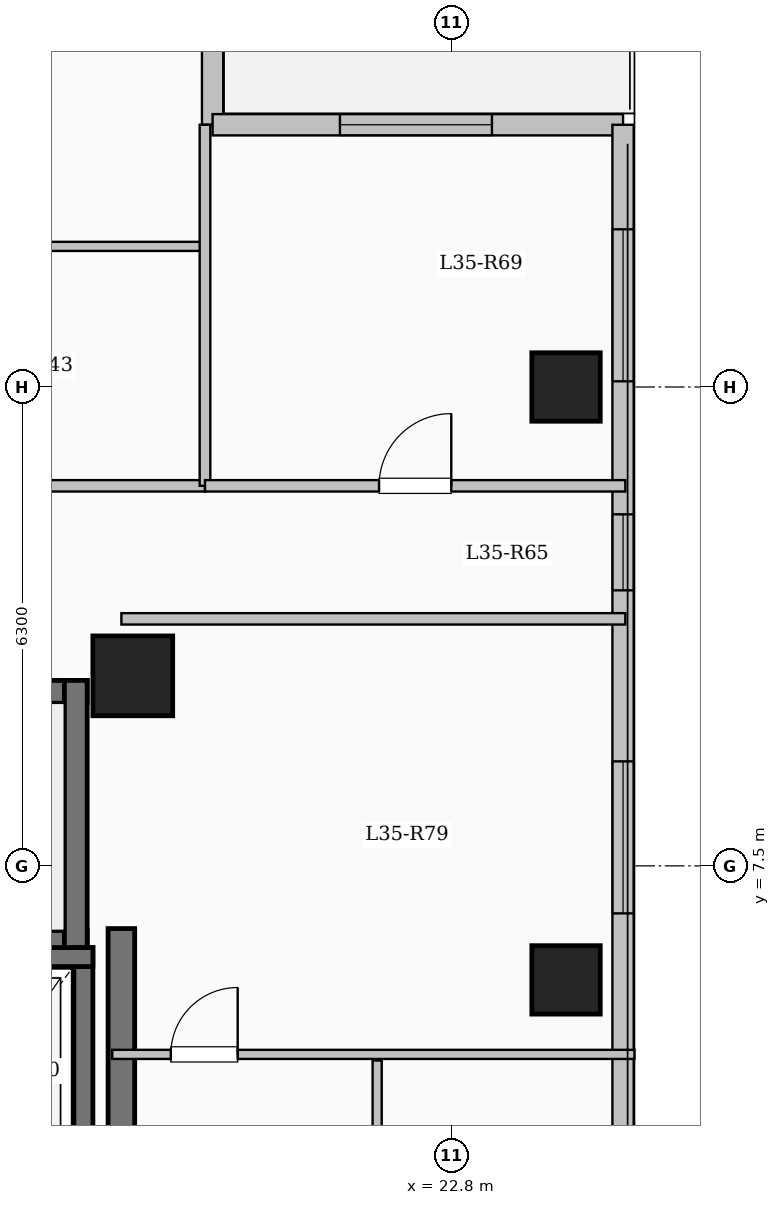
"""IFC4 building model, lengths in metres.
Left out: names, types, materials, properties, quantities, classifications, styles, units other than length and angle.
Written with IfcOpenShell. Run it as: python <this file> out.ifc"""

import sys

from ifc_helpers import new_model, si_unit, direction, frame, frame_2d, origin, origin_2d, place, context, subcontext, project, spatial, rectangle, extrude, element, fill, save


model = new_model("IFC4")
c1 = context("Model", 3, precision=1e-05, world=origin(), true_north=direction((0.0, 1.0)))
c2 = subcontext(c1, "Body", "Model", "MODEL_VIEW")
j1 = project(units=[si_unit("LENGTHUNIT", "METRE"), si_unit("PLANEANGLEUNIT", "RADIAN")], contexts=[c1])
p1 = place(None, origin())
s1 = spatial("IfcSite", under=j1, at=p1, CompositionType="ELEMENT")
p2 = place(p1, origin())
s2 = spatial("IfcBuilding", under=s1, at=p2, CompositionType="ELEMENT")
p3 = place(p2, frame((0.0, 0.0, 132.6)))
s3 = spatial("IfcBuildingStorey", under=s2, at=p3, CompositionType="ELEMENT", Elevation=132.6)
p4 = place(p3, frame((18.6, 10.0, 0.0), z_axis=(0.0, 0.0, 1.0), x_axis=(1.0, 0.0, 0.0)))
e1 = element("IfcColumn", 1, at=p4, inside=s3, PredefinedType="COLUMN", context=c2, shape_type="SweptSolid", body=[
    extrude(rectangle(XDim=1.05, YDim=1.05, at=origin_2d()), origin(), (0.0, 0.0, 1.0), 3.35),
])
for number, where, z_axis, x_axis in (
    (2, (24.3, 6.0, 0.0), (0.0, 0.0, 1.0), (1.0, 0.0, 0.0)),
    (3, (24.3, 13.8, 0.0), (0.0, 0.0, 1.0), (1.0, 0.0, 0.0)),
):
    element("IfcColumn", number, at=place(p3, frame(where, z_axis=z_axis, x_axis=x_axis)), inside=s3, PredefinedType="COLUMN", context=c2, shape_type="SweptSolid", body=[
        extrude(rectangle(XDim=0.9, YDim=0.9, at=origin_2d()), origin(), (0.0, 0.0, 1.0), 3.35),
    ])
p5 = place(p3, frame((19.65, 21.15, 0.0), z_axis=(0.0, 0.0, 1.0), x_axis=(0.0, -1.0, 0.0)))
e4 = element("IfcWall", 4, at=p5, inside=s3, PredefinedType="SOLIDWALL", context=c2, shape_type="SweptSolid", body=[
    extrude(rectangle(XDim=3.9, YDim=0.28, at=frame_2d((1.95, 0.0))), origin(), (0.0, 0.0, 1.0), 3.1),
])
p6 = place(p5, frame((1.5, 0.0, 0.0)))
e5 = element("IfcOpeningElement", 5, at=p6, cuts=e4, PredefinedType="OPENING", context=c2, shape_type="SweptSolid", body=[
    extrude(rectangle(XDim=1.1, YDim=2.2, at=frame_2d((0.55, 1.1))), frame((0.0, 0.15, 0.0), z_axis=(0.0, -1.0, 0.0), x_axis=(1.0, 0.0, 0.0)), (0.0, 0.0, 1.0), 0.3),
])
p7 = place(p5, frame((0.355, 0.0, 0.95)))
e6 = element("IfcOpeningElement", 6, at=p7, cuts=e4, PredefinedType="OPENING", context=c2, shape_type="SweptSolid", body=[
    extrude(rectangle(XDim=1.0, YDim=1.5, at=frame_2d((0.5, 0.75))), frame((0.0, 0.15, 0.0), z_axis=(0.0, -1.0, 0.0), x_axis=(1.0, 0.0, 0.0)), (0.0, 0.0, 1.0), 0.3),
])
p8 = place(p3, frame((19.65, 17.25, 0.0), z_axis=(0.0, 0.0, 1.0), x_axis=(1.0, 0.0, 0.0)))
e7 = element("IfcWall", 7, at=p8, inside=s3, PredefinedType="SOLIDWALL", context=c2, shape_type="SweptSolid", body=[
    extrude(rectangle(XDim=5.4, YDim=0.28, at=frame_2d((2.7, 0.0))), origin(), (0.0, 0.0, 1.0), 3.1),
])
p9 = place(p8, frame((1.675, 0.0, 0.9)))
e8 = element("IfcOpeningElement", 8, at=p9, cuts=e7, PredefinedType="OPENING", context=c2, shape_type="SweptSolid", body=[
    extrude(rectangle(XDim=2.0, YDim=1.7, at=frame_2d((1.0, 0.85))), frame((0.0, 0.15, 0.0), z_axis=(0.0, -1.0, 0.0), x_axis=(1.0, 0.0, 0.0)), (0.0, 0.0, 1.0), 0.3),
])
p10 = place(p3, frame((25.05, 17.25, 0.0), z_axis=(0.0, 0.0, 1.0), x_axis=(0.0, -1.0, 0.0)))
e9 = element("IfcWall", 9, at=p10, inside=s3, PredefinedType="SOLIDWALL", context=c2, shape_type="SweptSolid", body=[
    extrude(rectangle(XDim=34.5, YDim=0.28, at=frame_2d((17.25, 0.0))), origin(), (0.0, 0.0, 1.0), 3.1),
])
p11 = place(p10, frame((1.375, 0.0, 0.9)))
e10 = element("IfcOpeningElement", 10, at=p11, cuts=e9, PredefinedType="OPENING", context=c2, shape_type="SweptSolid", body=[
    extrude(rectangle(XDim=2.0, YDim=1.7, at=frame_2d((1.0, 0.85))), frame((0.0, 0.15, 0.0), z_axis=(0.0, -1.0, 0.0), x_axis=(1.0, 0.0, 0.0)), (0.0, 0.0, 1.0), 0.3),
])
p12 = place(p10, frame((5.125, 0.0, 0.95)))
e11 = element("IfcOpeningElement", 11, at=p12, cuts=e9, PredefinedType="OPENING", context=c2, shape_type="SweptSolid", body=[
    extrude(rectangle(XDim=1.0, YDim=1.5, at=frame_2d((0.5, 0.75))), frame((0.0, 0.15, 0.0), z_axis=(0.0, -1.0, 0.0), x_axis=(1.0, 0.0, 0.0)), (0.0, 0.0, 1.0), 0.3),
])
p13 = place(p10, frame((8.375, 0.0, 0.9)))
e12 = element("IfcOpeningElement", 12, at=p13, cuts=e9, PredefinedType="OPENING", context=c2, shape_type="SweptSolid", body=[
    extrude(rectangle(XDim=2.0, YDim=1.7, at=frame_2d((1.0, 0.85))), frame((0.0, 0.15, 0.0), z_axis=(0.0, -1.0, 0.0), x_axis=(1.0, 0.0, 0.0)), (0.0, 0.0, 1.0), 0.3),
])
p14 = place(p10, frame((13.2, 0.0, 0.9)))
e13 = element("IfcOpeningElement", 13, at=p14, cuts=e9, PredefinedType="OPENING", context=c2, shape_type="SweptSolid", body=[
    extrude(rectangle(XDim=1.65, YDim=1.6, at=frame_2d((0.825, 0.8))), frame((0.0, 0.15, 0.0), z_axis=(0.0, -1.0, 0.0), x_axis=(1.0, 0.0, 0.0)), (0.0, 0.0, 1.0), 0.3),
])
p15 = place(p10, frame((19.05, 0.0, 0.9)))
e14 = element("IfcOpeningElement", 14, at=p15, cuts=e9, PredefinedType="OPENING", context=c2, shape_type="SweptSolid", body=[
    extrude(rectangle(XDim=2.2, YDim=1.75, at=frame_2d((1.1, 0.875))), frame((0.0, 0.15, 0.0), z_axis=(0.0, -1.0, 0.0), x_axis=(1.0, 0.0, 0.0)), (0.0, 0.0, 1.0), 0.3),
])
p16 = place(p10, frame((25.258, 0.0, 0.9)))
e15 = element("IfcOpeningElement", 15, at=p16, cuts=e9, PredefinedType="OPENING", context=c2, shape_type="SweptSolid", body=[
    extrude(rectangle(XDim=1.5, YDim=1.65, at=frame_2d((0.75, 0.825))), frame((0.0, 0.15, 0.0), z_axis=(0.0, -1.0, 0.0), x_axis=(1.0, 0.0, 0.0)), (0.0, 0.0, 1.0), 0.3),
])
p17 = place(p10, frame((29.95, 0.0, 0.9)))
e16 = element("IfcOpeningElement", 16, at=p17, cuts=e9, PredefinedType="OPENING", context=c2, shape_type="SweptSolid", body=[
    extrude(rectangle(XDim=2.2, YDim=1.75, at=frame_2d((1.1, 0.875))), frame((0.0, 0.15, 0.0), z_axis=(0.0, -1.0, 0.0), x_axis=(1.0, 0.0, 0.0)), (0.0, 0.0, 1.0), 0.3),
])
p18 = place(p3, frame((10.0, 9.79, 0.0), z_axis=(0.0, 0.0, 1.0), x_axis=(1.0, 0.0, 0.0)))
e17 = element("IfcWall", 17, at=p18, inside=s3, PredefinedType="SHEAR", context=c2, shape_type="SweptSolid", body=[
    extrude(rectangle(XDim=8.0, YDim=0.3, at=frame_2d((4.0, 0.0))), origin(), (0.0, 0.0, 1.0), 3.35),
])
p19 = place(p3, frame((10.0, 6.5, 0.0), z_axis=(0.0, 0.0, 1.0), x_axis=(1.0, 0.0, 0.0)))
e18 = element("IfcWall", 18, at=p19, inside=s3, PredefinedType="SHEAR", context=c2, shape_type="SweptSolid", body=[
    extrude(rectangle(XDim=8.0, YDim=0.3, at=frame_2d((4.0, 0.0))), origin(), (0.0, 0.0, 1.0), 3.35),
])
p20 = place(p19, frame((0.55, 0.0, 0.0)))
e19 = element("IfcOpeningElement", 19, at=p20, cuts=e18, PredefinedType="OPENING", context=c2, shape_type="SweptSolid", body=[
    extrude(rectangle(XDim=1.0, YDim=2.15, at=frame_2d((0.5, 1.075))), frame((0.0, 0.16, 0.0), z_axis=(0.0, -1.0, 0.0), x_axis=(1.0, 0.0, 0.0)), (0.0, 0.0, 1.0), 0.32),
])
p21 = place(p3, frame((17.85, 6.35, 0.0), z_axis=(0.0, 0.0, 1.0), x_axis=(0.0, 1.0, 0.0)))
e20 = element("IfcWall", 20, at=p21, inside=s3, PredefinedType="SHEAR", context=c2, shape_type="SweptSolid", body=[
    extrude(rectangle(XDim=3.59, YDim=0.3, at=frame_2d((1.795, 0.0))), origin(), (0.0, 0.0, 1.0), 3.35),
])
p22 = place(p3, frame((17.95, 3.175, 0.0), z_axis=(0.0, 0.0, 1.0), x_axis=(0.0, 1.0, 0.0)))
e21 = element("IfcWall", 21, at=p22, inside=s3, PredefinedType="SHEAR", context=c2, shape_type="SweptSolid", body=[
    extrude(rectangle(XDim=3.25, YDim=0.25, at=frame_2d((1.625, 0.0))), origin(), (0.0, 0.0, 1.0), 3.35),
])
p23 = place(p3, frame((15.525, 6.3, 0.0), z_axis=(0.0, 0.0, 1.0), x_axis=(1.0, 0.0, 0.0)))
e22 = element("IfcWall", 22, at=p23, inside=s3, PredefinedType="SHEAR", context=c2, shape_type="SweptSolid", body=[
    extrude(rectangle(XDim=2.55, YDim=0.25, at=frame_2d((1.275, 0.0))), origin(), (0.0, 0.0, 1.0), 3.35),
])
p24 = place(p3, frame((18.45, -7.375, 0.0), z_axis=(0.0, 0.0, 1.0), x_axis=(0.0, 1.0, 0.0)))
e23 = element("IfcWall", 23, at=p24, inside=s3, PredefinedType="SHEAR", context=c2, shape_type="SweptSolid", body=[
    extrude(rectangle(XDim=14.05, YDim=0.35, at=frame_2d((7.025, 0.0))), origin(), (0.0, 0.0, 1.0), 3.35),
])
p25 = place(p3, frame((3.85, 12.5, 0.0), z_axis=(0.0, 0.0, 1.0), x_axis=(1.0, 0.0, 0.0)))
e24 = element("IfcWall", 24, at=p25, inside=s3, PredefinedType="PARTITIONING", context=c2, shape_type="SweptSolid", body=[
    extrude(rectangle(XDim=15.7, YDim=0.15, at=frame_2d((7.85, 0.0))), origin(), (0.0, 0.0, 1.0), 3.1),
])
p26 = place(p25, frame((0.55, 0.0, 0.0)))
e25 = element("IfcOpeningElement", 25, at=p26, cuts=e24, PredefinedType="OPENING", context=c2, shape_type="SweptSolid", body=[
    extrude(rectangle(XDim=0.96, YDim=2.15, at=frame_2d((0.48, 1.075))), frame((0.0, 0.085, 0.0), z_axis=(0.0, -1.0, 0.0), x_axis=(1.0, 0.0, 0.0)), (0.0, 0.0, 1.0), 0.17),
])
p27 = place(p25, frame((7.28, 0.0, 0.0)))
e26 = element("IfcOpeningElement", 26, at=p27, cuts=e24, PredefinedType="OPENING", context=c2, shape_type="SweptSolid", body=[
    extrude(rectangle(XDim=0.96, YDim=2.15, at=frame_2d((0.48, 1.075))), frame((0.0, 0.085, 0.0), z_axis=(0.0, -1.0, 0.0), x_axis=(1.0, 0.0, 0.0)), (0.0, 0.0, 1.0), 0.17),
])
p28 = place(p3, frame((14.93, 15.65, 0.0), z_axis=(0.0, 0.0, 1.0), x_axis=(1.0, 0.0, 0.0)))
e27 = element("IfcWall", 27, at=p28, inside=s3, PredefinedType="PARTITIONING", context=c2, shape_type="SweptSolid", body=[
    extrude(rectangle(XDim=4.68, YDim=0.12, at=frame_2d((2.34, 0.0))), origin(), (0.0, 0.0, 1.0), 3.1),
])
p29 = place(p3, frame((18.45, 10.75, 0.0), z_axis=(0.0, 0.0, 1.0), x_axis=(1.0, 0.0, 0.0)))
e28 = element("IfcWall", 28, at=p29, inside=s3, PredefinedType="PARTITIONING", context=c2, shape_type="SweptSolid", body=[
    extrude(rectangle(XDim=6.63, YDim=0.15, at=frame_2d((3.315, 0.0))), origin(), (0.0, 0.0, 1.0), 3.1),
])
p30 = place(p3, frame((19.55, 12.5, 0.0), z_axis=(0.0, 0.0, 1.0), x_axis=(0.0, 1.0, 0.0)))
e29 = element("IfcWall", 29, at=p30, inside=s3, PredefinedType="PARTITIONING", context=c2, shape_type="SweptSolid", body=[
    extrude(rectangle(XDim=4.75, YDim=0.14, at=frame_2d((2.375, 0.0))), origin(), (0.0, 0.0, 1.0), 3.1),
])
p31 = place(p3, frame((19.55, 12.5, 0.0), z_axis=(0.0, 0.0, 1.0), x_axis=(1.0, 0.0, 0.0)))
e30 = element("IfcWall", 30, at=p31, inside=s3, PredefinedType="PARTITIONING", context=c2, shape_type="SweptSolid", body=[
    extrude(rectangle(XDim=5.53, YDim=0.15, at=frame_2d((2.765, 0.0))), origin(), (0.0, 0.0, 1.0), 3.1),
])
p32 = place(p31, frame((2.29, 0.0, 0.0)))
e31 = element("IfcOpeningElement", 31, at=p32, cuts=e30, PredefinedType="OPENING", context=c2, shape_type="SweptSolid", body=[
    extrude(rectangle(XDim=0.95, YDim=2.15, at=frame_2d((0.475, 1.075))), frame((0.0, 0.085, 0.0), z_axis=(0.0, -1.0, 0.0), x_axis=(1.0, 0.0, 0.0)), (0.0, 0.0, 1.0), 0.17),
])
p33 = place(p3, frame((18.33, 5.02, 0.0), z_axis=(0.0, 0.0, 1.0), x_axis=(1.0, 0.0, 0.0)))
e32 = element("IfcWall", 32, at=p33, inside=s3, PredefinedType="PARTITIONING", context=c2, shape_type="SweptSolid", body=[
    extrude(rectangle(XDim=6.87, YDim=0.12, at=frame_2d((3.435, 0.0))), origin(), (0.0, 0.0, 1.0), 3.1),
])
p34 = place(p33, frame((0.77, 0.0, 0.0)))
e33 = element("IfcOpeningElement", 33, at=p34, cuts=e32, PredefinedType="OPENING", context=c2, shape_type="SweptSolid", body=[
    extrude(rectangle(XDim=0.88, YDim=2.1, at=frame_2d((0.44, 1.05))), frame((0.0, 0.07, 0.0), z_axis=(0.0, -1.0, 0.0), x_axis=(1.0, 0.0, 0.0)), (0.0, 0.0, 1.0), 0.14),
])
p35 = place(p3, frame((21.815, 1.36, 0.0), z_axis=(0.0, 0.0, 1.0), x_axis=(0.0, 1.0, 0.0)))
e34 = element("IfcWall", 34, at=p35, inside=s3, PredefinedType="PARTITIONING", context=c2, shape_type="SweptSolid", body=[
    extrude(rectangle(XDim=3.58, YDim=0.12, at=frame_2d((1.79, 0.0))), origin(), (0.0, 0.0, 1.0), 3.1),
])
p36 = place(p9, origin())
e35 = element("IfcWindow", 35, at=p36, inside=s3, PartitioningType="SINGLE_PANEL", PredefinedType="WINDOW", context=c2, shape_type="SweptSolid", body=[
    extrude(rectangle(XDim=2.0, YDim=1.7, at=frame_2d((1.0, 0.85))), frame((0.0, 0.03, 0.0), z_axis=(0.0, -1.0, 0.0), x_axis=(1.0, 0.0, 0.0)), (0.0, 0.0, 1.0), 0.06),
])
fill(e8, e35)
p37 = place(p11, origin())
e36 = element("IfcWindow", 36, at=p37, inside=s3, PartitioningType="SINGLE_PANEL", PredefinedType="WINDOW", context=c2, shape_type="SweptSolid", body=[
    extrude(rectangle(XDim=2.0, YDim=1.7, at=frame_2d((1.0, 0.85))), frame((0.0, 0.03, 0.0), z_axis=(0.0, -1.0, 0.0), x_axis=(1.0, 0.0, 0.0)), (0.0, 0.0, 1.0), 0.06),
])
fill(e10, e36)
p38 = place(p12, origin())
e37 = element("IfcWindow", 37, at=p38, inside=s3, PartitioningType="SINGLE_PANEL", PredefinedType="WINDOW", context=c2, shape_type="SweptSolid", body=[
    extrude(rectangle(XDim=1.0, YDim=1.5, at=frame_2d((0.5, 0.75))), frame((0.0, 0.03, 0.0), z_axis=(0.0, -1.0, 0.0), x_axis=(1.0, 0.0, 0.0)), (0.0, 0.0, 1.0), 0.06),
])
fill(e11, e37)
p39 = place(p13, origin())
e38 = element("IfcWindow", 38, at=p39, inside=s3, PartitioningType="SINGLE_PANEL", PredefinedType="WINDOW", context=c2, shape_type="SweptSolid", body=[
    extrude(rectangle(XDim=2.0, YDim=1.7, at=frame_2d((1.0, 0.85))), frame((0.0, 0.03, 0.0), z_axis=(0.0, -1.0, 0.0), x_axis=(1.0, 0.0, 0.0)), (0.0, 0.0, 1.0), 0.06),
])
fill(e12, e38)
p40 = place(p32, origin())
e39 = element("IfcDoor", 39, at=p40, inside=s3, OperationType="SINGLE_SWING_RIGHT", PredefinedType="DOOR", context=c2, shape_type="SweptSolid", body=[
    extrude(rectangle(XDim=0.95, YDim=2.15, at=frame_2d((0.475, 1.075))), frame((0.0, 0.025, 0.0), z_axis=(0.0, -1.0, 0.0), x_axis=(1.0, 0.0, 0.0)), (0.0, 0.0, 1.0), 0.05),
])
fill(e31, e39)
p41 = place(p34, origin())
e40 = element("IfcDoor", 40, at=p41, inside=s3, OperationType="SINGLE_SWING_RIGHT", PredefinedType="DOOR", context=c2, shape_type="SweptSolid", body=[
    extrude(rectangle(XDim=0.88, YDim=2.1, at=frame_2d((0.44, 1.05))), frame((0.0, 0.025, 0.0), z_axis=(0.0, -1.0, 0.0), x_axis=(1.0, 0.0, 0.0)), (0.0, 0.0, 1.0), 0.05),
])
fill(e33, e40)
save(model, sys.argv[1])
